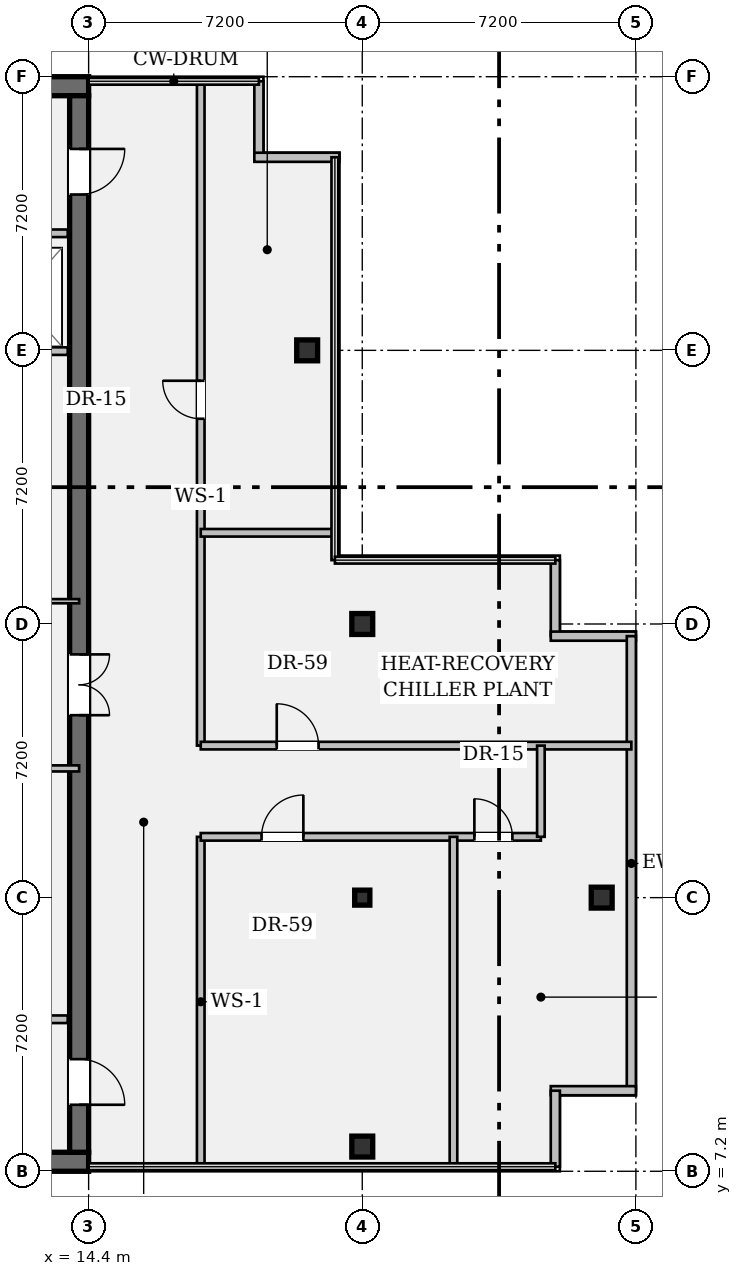
"""IFC4 building model, lengths in metres.
Left out: names, types, materials, properties, quantities, classifications, styles, units other than length and angle.
Written with IfcOpenShell. Run it as: python <this file> out.ifc"""

import sys

from ifc_helpers import new_model, si_unit, direction, frame, frame_2d, origin, origin_2d, place, context, subcontext, project, spatial, rectangle, hollow_rectangle, i_section, extrude, element, fill, save


model = new_model("IFC4")
c1 = context("Model", 3, precision=1e-05, world=origin(), true_north=direction((0.0, 1.0)))
c2 = subcontext(c1, "Body", "Model", "MODEL_VIEW")
j1 = project(units=[si_unit("LENGTHUNIT", "METRE"), si_unit("PLANEANGLEUNIT", "RADIAN")], contexts=[c1])
p1 = place(None, origin())
s1 = spatial("IfcSite", under=j1, at=p1, CompositionType="ELEMENT")
p2 = place(p1, origin())
s2 = spatial("IfcBuilding", under=s1, at=p2, CompositionType="ELEMENT")
p3 = place(p2, frame((0.0, 0.0, 297.5)))
s3 = spatial("IfcBuildingStorey", under=s2, at=p3, CompositionType="ELEMENT", Elevation=297.5)
for number, where, z_axis, x_axis in (
    (1, (0.5, 7.45, 0.0), (0.0, 0.0, 1.0), (1.0, 0.0, 0.0)),
    (2, (0.5, 35.75, 0.0), (0.0, 0.0, 1.0), (1.0, 0.0, 0.0)),
):
    element("IfcWall", number, at=place(p3, frame(where, z_axis=z_axis, x_axis=x_axis)), inside=s3, PredefinedType="SHEAR", context=c2, shape_type="SweptSolid", body=[
        extrude(rectangle(XDim=13.9, YDim=0.5, at=frame_2d((6.95, 0.0))), origin(), (0.0, 0.0, 1.0), 3.59),
    ])
p4 = place(p3, frame((14.15, 35.5, 0.0), z_axis=(0.0, 0.0, 1.0), x_axis=(0.0, -1.0, 0.0)))
e3 = element("IfcWall", 3, at=p4, inside=s3, PredefinedType="SHEAR", context=c2, shape_type="SweptSolid", body=[
    extrude(rectangle(XDim=27.8, YDim=0.5, at=frame_2d((13.9, 0.0))), origin(), (0.0, 0.0, 1.0), 3.59),
])
p5 = place(p4, frame((1.4, 0.0, 0.0)))
e4 = element("IfcOpeningElement", 4, at=p5, cuts=e3, PredefinedType="OPENING", context=c2, shape_type="SweptSolid", body=[
    extrude(rectangle(XDim=1.2, YDim=2.15, at=frame_2d((0.6, 1.075))), frame((0.0, 0.262, 0.0), z_axis=(0.0, -1.0, 0.0), x_axis=(1.0, 0.0, 0.0)), (0.0, 0.0, 1.0), 0.524),
])
p6 = place(p4, frame((25.35, 0.0, 0.0)))
e5 = element("IfcOpeningElement", 5, at=p6, cuts=e3, PredefinedType="OPENING", context=c2, shape_type="SweptSolid", body=[
    extrude(rectangle(XDim=1.2, YDim=2.15, at=frame_2d((0.6, 1.075))), frame((0.0, 0.262, 0.0), z_axis=(0.0, -1.0, 0.0), x_axis=(1.0, 0.0, 0.0)), (0.0, 0.0, 1.0), 0.524),
])
p7 = place(p4, frame((14.7, 0.0, 0.0)))
e6 = element("IfcOpeningElement", 6, at=p7, cuts=e3, PredefinedType="OPENING", context=c2, shape_type="SweptSolid", body=[
    extrude(rectangle(XDim=1.6, YDim=2.2, at=frame_2d((0.8, 1.1))), frame((0.0, 0.262, 0.0), z_axis=(0.0, -1.0, 0.0), x_axis=(1.0, 0.0, 0.0)), (0.0, 0.0, 1.0), 0.524),
])
for number, where, z_axis, x_axis in (
    (7, (20.15, 28.8, 0.0), (0.0, 0.0, 1.0), (1.0, 0.0, 0.0)),
    (8, (21.6, 7.85, 0.0), (0.0, 0.0, 1.0), (1.0, 0.0, 0.0)),
):
    element("IfcColumn", number, at=place(p3, frame(where, z_axis=z_axis, x_axis=x_axis)), inside=s3, PredefinedType="COLUMN", context=c2, shape_type="SweptSolid", body=[
        extrude(hollow_rectangle(XDim=0.55, YDim=0.55, WallThickness=0.035, at=origin_2d()), origin(), (0.0, 0.0, 1.0), 3.59),
    ])
p8 = place(p3, frame((21.6, 14.4, 0.0), z_axis=(0.0, 0.0, 1.0), x_axis=(1.0, 0.0, 0.0)))
e9 = element("IfcColumn", 9, at=p8, inside=s3, PredefinedType="COLUMN", context=c2, shape_type="SweptSolid", body=[
    extrude(i_section(OverallWidth=0.399, OverallDepth=0.394, WebThickness=0.023, FlangeThickness=0.037, FilletRadius=0.018, at=origin_2d()), origin(), (0.0, 0.0, 1.0), 3.59),
])
for number, where, z_axis, x_axis in (
    (10, (21.6, 21.6, 0.0), (0.0, 0.0, 1.0), (1.0, 0.0, 0.0)),
    (11, (27.9, 14.4, 0.0), (0.0, 0.0, 1.0), (1.0, 0.0, 0.0)),
):
    element("IfcColumn", number, at=place(p3, frame(where, z_axis=z_axis, x_axis=x_axis)), inside=s3, PredefinedType="COLUMN", context=c2, shape_type="SweptSolid", body=[
        extrude(hollow_rectangle(XDim=0.55, YDim=0.55, WallThickness=0.035, at=origin_2d()), origin(), (0.0, 0.0, 1.0), 3.59),
    ])
p9 = place(p3, frame((18.88, 35.88, 0.0), z_axis=(0.0, 0.0, 1.0), x_axis=(0.0, -1.0, 0.0)))
e12 = element("IfcWall", 12, at=p9, inside=s3, PredefinedType="STANDARD", context=c2, shape_type="SweptSolid", body=[
    extrude(rectangle(XDim=2.0, YDim=0.24, at=frame_2d((1.0, 0.0))), origin(), (0.0, 0.0, 1.0), 3.59),
])
p10 = place(p3, frame((18.76, 33.88, 0.0), z_axis=(0.0, 0.0, 1.0), x_axis=(1.0, 0.0, 0.0)))
e13 = element("IfcWall", 13, at=p10, inside=s3, PredefinedType="STANDARD", context=c2, shape_type="SweptSolid", body=[
    extrude(rectangle(XDim=2.24, YDim=0.24, at=frame_2d((1.12, 0.0))), origin(), (0.0, 0.0, 1.0), 3.59),
])
p11 = place(p3, frame((26.68, 23.28, 0.0), z_axis=(0.0, 0.0, 1.0), x_axis=(0.0, -1.0, 0.0)))
e14 = element("IfcWall", 14, at=p11, inside=s3, PredefinedType="STANDARD", context=c2, shape_type="SweptSolid", body=[
    extrude(rectangle(XDim=2.0, YDim=0.24, at=frame_2d((1.0, 0.0))), origin(), (0.0, 0.0, 1.0), 3.59),
])
p12 = place(p3, frame((26.56, 21.28, 0.0), z_axis=(0.0, 0.0, 1.0), x_axis=(1.0, 0.0, 0.0)))
e15 = element("IfcWall", 15, at=p12, inside=s3, PredefinedType="STANDARD", context=c2, shape_type="SweptSolid", body=[
    extrude(rectangle(XDim=2.24, YDim=0.24, at=frame_2d((1.12, 0.0))), origin(), (0.0, 0.0, 1.0), 3.59),
])
p13 = place(p3, frame((28.68, 21.28, 0.0), z_axis=(0.0, 0.0, 1.0), x_axis=(0.0, -1.0, 0.0)))
e16 = element("IfcWall", 16, at=p13, inside=s3, PredefinedType="STANDARD", context=c2, shape_type="SweptSolid", body=[
    extrude(rectangle(XDim=11.96, YDim=0.24, at=frame_2d((5.98, 0.0))), origin(), (0.0, 0.0, 1.0), 3.59),
])
p14 = place(p3, frame((28.8, 9.32, 0.0), z_axis=(0.0, 0.0, 1.0), x_axis=(-1.0, 0.0, 0.0)))
e17 = element("IfcWall", 17, at=p14, inside=s3, PredefinedType="STANDARD", context=c2, shape_type="SweptSolid", body=[
    extrude(rectangle(XDim=2.24, YDim=0.24, at=frame_2d((1.12, 0.0))), origin(), (0.0, 0.0, 1.0), 3.59),
])
p15 = place(p3, frame((26.68, 9.32, 0.0), z_axis=(0.0, 0.0, 1.0), x_axis=(0.0, -1.0, 0.0)))
e18 = element("IfcWall", 18, at=p15, inside=s3, PredefinedType="STANDARD", context=c2, shape_type="SweptSolid", body=[
    extrude(rectangle(XDim=2.0, YDim=0.24, at=frame_2d((1.0, 0.0))), origin(), (0.0, 0.0, 1.0), 3.59),
])
p16 = place(p3, frame((8.7, 31.88, 0.0), z_axis=(0.0, 0.0, 1.0), x_axis=(1.0, 0.0, 0.0)))
e19 = element("IfcWall", 19, at=p16, inside=s3, PredefinedType="PARTITIONING", context=c2, shape_type="SweptSolid", body=[
    extrude(rectangle(XDim=5.15, YDim=0.2, at=frame_2d((2.575, 0.0))), origin(), (0.0, 0.0, 1.0), 3.59),
])
p17 = place(p16, frame((0.75, 0.0, 0.0)))
e20 = element("IfcOpeningElement", 20, at=p17, cuts=e19, PredefinedType="OPENING", context=c2, shape_type="SweptSolid", body=[
    extrude(rectangle(XDim=1.2, YDim=2.2, at=frame_2d((0.6, 1.1))), frame((0.0, 0.112, 0.0), z_axis=(0.0, -1.0, 0.0), x_axis=(1.0, 0.0, 0.0)), (0.0, 0.0, 1.0), 0.224),
])
p18 = place(p16, frame((3.25, 0.0, 0.0)))
e21 = element("IfcOpeningElement", 21, at=p18, cuts=e19, PredefinedType="OPENING", context=c2, shape_type="SweptSolid", body=[
    extrude(rectangle(XDim=1.2, YDim=2.2, at=frame_2d((0.6, 1.1))), frame((0.0, 0.112, 0.0), z_axis=(0.0, -1.0, 0.0), x_axis=(1.0, 0.0, 0.0)), (0.0, 0.0, 1.0), 0.224),
])
for number, where, z_axis, x_axis in (
    (22, (8.7, 11.2, 0.0), (0.0, 0.0, 1.0), (1.0, 0.0, 0.0)),
    (23, (8.7, 28.78, 0.0), (0.0, 0.0, 1.0), (1.0, 0.0, 0.0)),
):
    element("IfcWall", number, at=place(p3, frame(where, z_axis=z_axis, x_axis=x_axis)), inside=s3, PredefinedType="PARTITIONING", context=c2, shape_type="SweptSolid", body=[
        extrude(rectangle(XDim=5.15, YDim=0.2, at=frame_2d((2.575, 0.0))), origin(), (0.0, 0.0, 1.0), 3.59),
    ])
p19 = place(p3, frame((7.1, 22.2, 0.0), z_axis=(0.0, 0.0, 1.0), x_axis=(1.0, 0.0, 0.0)))
e24 = element("IfcWall", 24, at=p19, inside=s3, PredefinedType="PARTITIONING", context=c2, shape_type="SweptSolid", body=[
    extrude(rectangle(XDim=7.05, YDim=0.11, at=frame_2d((3.525, 0.0))), origin(), (0.0, 0.0, 1.0), 3.59),
])
p20 = place(p19, frame((2.4, 0.0, 0.0)))
e25 = element("IfcOpeningElement", 25, at=p20, cuts=e24, PredefinedType="OPENING", context=c2, shape_type="SweptSolid", body=[
    extrude(rectangle(XDim=1.0, YDim=2.15, at=frame_2d((0.5, 1.075))), frame((0.0, 0.067, 0.0), z_axis=(0.0, -1.0, 0.0), x_axis=(1.0, 0.0, 0.0)), (0.0, 0.0, 1.0), 0.134),
])
p21 = place(p3, frame((5.15, 17.8, 0.0), z_axis=(0.0, 0.0, 1.0), x_axis=(1.0, 0.0, 0.0)))
e26 = element("IfcWall", 26, at=p21, inside=s3, PredefinedType="PARTITIONING", context=c2, shape_type="SweptSolid", body=[
    extrude(rectangle(XDim=9.0, YDim=0.16, at=frame_2d((4.5, 0.0))), origin(), (0.0, 0.0, 1.0), 3.59),
])
p22 = place(p21, frame((2.65, 0.0, 0.0)))
e27 = element("IfcOpeningElement", 27, at=p22, cuts=e26, PredefinedType="OPENING", context=c2, shape_type="SweptSolid", body=[
    extrude(rectangle(XDim=0.9, YDim=2.15, at=frame_2d((0.45, 1.075))), frame((0.0, 0.092, 0.0), z_axis=(0.0, -1.0, 0.0), x_axis=(1.0, 0.0, 0.0)), (0.0, 0.0, 1.0), 0.184),
])
p23 = place(p21, frame((6.15, 0.0, 0.0)))
e28 = element("IfcOpeningElement", 28, at=p23, cuts=e26, PredefinedType="OPENING", context=c2, shape_type="SweptSolid", body=[
    extrude(rectangle(XDim=0.88, YDim=2.15, at=frame_2d((0.44, 1.075))), frame((0.0, 0.092, 0.0), z_axis=(0.0, -1.0, 0.0), x_axis=(1.0, 0.0, 0.0)), (0.0, 0.0, 1.0), 0.184),
])
p24 = place(p3, frame((17.35, 7.32, 0.0), z_axis=(0.0, 0.0, 1.0), x_axis=(0.0, 1.0, 0.0)))
e29 = element("IfcWall", 29, at=p24, inside=s3, PredefinedType="PARTITIONING", context=c2, shape_type="SweptSolid", body=[
    extrude(rectangle(XDim=8.68, YDim=0.2, at=frame_2d((4.34, 0.0))), origin(), (0.0, 0.0, 1.0), 3.026),
])
p25 = place(p3, frame((17.35, 18.4, 0.0), z_axis=(0.0, 0.0, 1.0), x_axis=(0.0, 1.0, 0.0)))
e30 = element("IfcWall", 30, at=p25, inside=s3, PredefinedType="PARTITIONING", context=c2, shape_type="SweptSolid", body=[
    extrude(rectangle(XDim=17.48, YDim=0.2, at=frame_2d((8.74, 0.0))), origin(), (0.0, 0.0, 1.0), 3.026),
])
p26 = place(p25, frame((8.6, 0.0, 0.0)))
e31 = element("IfcOpeningElement", 31, at=p26, cuts=e30, PredefinedType="OPENING", context=c2, shape_type="SweptSolid", body=[
    extrude(rectangle(XDim=1.0, YDim=2.15, at=frame_2d((0.5, 1.075))), frame((0.0, 0.112, 0.0), z_axis=(0.0, -1.0, 0.0), x_axis=(1.0, 0.0, 0.0)), (0.0, 0.0, 1.0), 0.224),
])
p27 = place(p3, frame((17.35, 16.0, 0.0), z_axis=(0.0, 0.0, 1.0), x_axis=(1.0, 0.0, 0.0)))
e32 = element("IfcWall", 32, at=p27, inside=s3, PredefinedType="PARTITIONING", context=c2, shape_type="SweptSolid", body=[
    extrude(rectangle(XDim=8.95, YDim=0.2, at=frame_2d((4.475, 0.0))), origin(), (0.0, 0.0, 1.0), 3.026),
])
p28 = place(p27, frame((1.6, 0.0, 0.0)))
e33 = element("IfcOpeningElement", 33, at=p28, cuts=e32, PredefinedType="OPENING", context=c2, shape_type="SweptSolid", body=[
    extrude(rectangle(XDim=1.1, YDim=2.15, at=frame_2d((0.55, 1.075))), frame((0.0, 0.112, 0.0), z_axis=(0.0, -1.0, 0.0), x_axis=(1.0, 0.0, 0.0)), (0.0, 0.0, 1.0), 0.224),
])
p29 = place(p27, frame((7.2, 0.0, 0.0)))
e34 = element("IfcOpeningElement", 34, at=p29, cuts=e32, PredefinedType="OPENING", context=c2, shape_type="SweptSolid", body=[
    extrude(rectangle(XDim=1.0, YDim=2.15, at=frame_2d((0.5, 1.075))), frame((0.0, 0.112, 0.0), z_axis=(0.0, -1.0, 0.0), x_axis=(1.0, 0.0, 0.0)), (0.0, 0.0, 1.0), 0.224),
])
p30 = place(p3, frame((17.35, 18.4, 0.0), z_axis=(0.0, 0.0, 1.0), x_axis=(1.0, 0.0, 0.0)))
e35 = element("IfcWall", 35, at=p30, inside=s3, PredefinedType="PARTITIONING", context=c2, shape_type="SweptSolid", body=[
    extrude(rectangle(XDim=11.33, YDim=0.2, at=frame_2d((5.665, 0.0))), origin(), (0.0, 0.0, 1.0), 3.026),
])
p31 = place(p30, frame((2.0, 0.0, 0.0)))
e36 = element("IfcOpeningElement", 36, at=p31, cuts=e35, PredefinedType="OPENING", context=c2, shape_type="SweptSolid", body=[
    extrude(rectangle(XDim=1.1, YDim=2.15, at=frame_2d((0.55, 1.075))), frame((0.0, 0.112, 0.0), z_axis=(0.0, -1.0, 0.0), x_axis=(1.0, 0.0, 0.0)), (0.0, 0.0, 1.0), 0.224),
])
p32 = place(p3, frame((17.35, 24.0, 0.0), z_axis=(0.0, 0.0, 1.0), x_axis=(1.0, 0.0, 0.0)))
e37 = element("IfcWall", 37, at=p32, inside=s3, PredefinedType="PARTITIONING", context=c2, shape_type="SweptSolid", body=[
    extrude(rectangle(XDim=3.53, YDim=0.2, at=frame_2d((1.765, 0.0))), origin(), (0.0, 0.0, 1.0), 3.265),
])
p33 = place(p3, frame((24.0, 7.32, 0.0), z_axis=(0.0, 0.0, 1.0), x_axis=(0.0, 1.0, 0.0)))
e38 = element("IfcWall", 38, at=p33, inside=s3, PredefinedType="PARTITIONING", context=c2, shape_type="SweptSolid", body=[
    extrude(rectangle(XDim=8.68, YDim=0.2, at=frame_2d((4.34, 0.0))), origin(), (0.0, 0.0, 1.0), 3.026),
])
p34 = place(p3, frame((26.3, 16.0, 0.0), z_axis=(0.0, 0.0, 1.0), x_axis=(0.0, 1.0, 0.0)))
e39 = element("IfcWall", 39, at=p34, inside=s3, PredefinedType="PARTITIONING", context=c2, shape_type="SweptSolid", body=[
    extrude(rectangle(XDim=2.4, YDim=0.2, at=frame_2d((1.2, 0.0))), origin(), (0.0, 0.0, 1.0), 3.59),
])
p35 = place(p5, origin())
e40 = element("IfcDoor", 40, at=p35, inside=s3, OperationType="SINGLE_SWING_LEFT", PredefinedType="DOOR", context=c2, shape_type="SweptSolid", body=[
    extrude(rectangle(XDim=1.2, YDim=2.15, at=frame_2d((0.6, 1.075))), frame((0.0, 0.025, 0.0), z_axis=(0.0, -1.0, 0.0), x_axis=(1.0, 0.0, 0.0)), (0.0, 0.0, 1.0), 0.05),
])
fill(e4, e40)
p36 = place(p6, origin())
e41 = element("IfcDoor", 41, at=p36, inside=s3, OperationType="SINGLE_SWING_RIGHT", PredefinedType="DOOR", context=c2, shape_type="SweptSolid", body=[
    extrude(rectangle(XDim=1.2, YDim=2.15, at=frame_2d((0.6, 1.075))), frame((0.0, 0.025, 0.0), z_axis=(0.0, -1.0, 0.0), x_axis=(1.0, 0.0, 0.0)), (0.0, 0.0, 1.0), 0.05),
])
fill(e5, e41)
p37 = place(p7, origin())
e42 = element("IfcDoor", 42, at=p37, inside=s3, OperationType="DOUBLE_DOOR_SINGLE_SWING", PredefinedType="DOOR", context=c2, shape_type="SweptSolid", body=[
    extrude(rectangle(XDim=1.6, YDim=2.2, at=frame_2d((0.8, 1.1))), frame((0.0, 0.025, 0.0), z_axis=(0.0, -1.0, 0.0), x_axis=(1.0, 0.0, 0.0)), (0.0, 0.0, 1.0), 0.05),
])
fill(e6, e42)
p38 = place(p26, origin())
e43 = element("IfcDoor", 43, at=p38, inside=s3, OperationType="SINGLE_SWING_RIGHT", PredefinedType="DOOR", context=c2, shape_type="SweptSolid", body=[
    extrude(rectangle(XDim=1.0, YDim=2.15, at=frame_2d((0.5, 1.075))), frame((0.0, 0.025, 0.0), z_axis=(0.0, -1.0, 0.0), x_axis=(1.0, 0.0, 0.0)), (0.0, 0.0, 1.0), 0.05),
])
fill(e31, e43)
p39 = place(p31, origin())
e44 = element("IfcDoor", 44, at=p39, inside=s3, OperationType="SINGLE_SWING_LEFT", PredefinedType="DOOR", context=c2, shape_type="SweptSolid", body=[
    extrude(rectangle(XDim=1.1, YDim=2.15, at=frame_2d((0.55, 1.075))), frame((0.0, 0.025, 0.0), z_axis=(0.0, -1.0, 0.0), x_axis=(1.0, 0.0, 0.0)), (0.0, 0.0, 1.0), 0.05),
])
fill(e36, e44)
p40 = place(p28, origin())
e45 = element("IfcDoor", 45, at=p40, inside=s3, OperationType="SINGLE_SWING_RIGHT", PredefinedType="DOOR", context=c2, shape_type="SweptSolid", body=[
    extrude(rectangle(XDim=1.1, YDim=2.15, at=frame_2d((0.55, 1.075))), frame((0.0, 0.025, 0.0), z_axis=(0.0, -1.0, 0.0), x_axis=(1.0, 0.0, 0.0)), (0.0, 0.0, 1.0), 0.05),
])
fill(e33, e45)
p41 = place(p29, origin())
e46 = element("IfcDoor", 46, at=p41, inside=s3, OperationType="SINGLE_SWING_LEFT", PredefinedType="DOOR", context=c2, shape_type="SweptSolid", body=[
    extrude(rectangle(XDim=1.0, YDim=2.15, at=frame_2d((0.5, 1.075))), frame((0.0, 0.025, 0.0), z_axis=(0.0, -1.0, 0.0), x_axis=(1.0, 0.0, 0.0)), (0.0, 0.0, 1.0), 0.05),
])
fill(e34, e46)
save(model, sys.argv[1])
